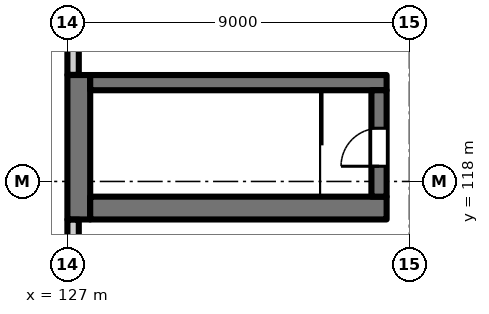
"""IFC4 building model, lengths in metres.
Left out: names, types, materials, properties, quantities, classifications, styles, units other than length and angle.
Written with IfcOpenShell. Run it as: python <this file> out.ifc"""

import sys

from ifc_helpers import new_model, si_unit, direction, frame, frame_2d, origin, place, context, subcontext, project, spatial, rectangle, extrude, element, fill, save


model = new_model("IFC4")
c1 = context("Model", 3, precision=1e-05, world=origin(), true_north=direction((0.0, 1.0)))
c2 = subcontext(c1, "Body", "Model", "MODEL_VIEW")
j1 = project(units=[si_unit("LENGTHUNIT", "METRE"), si_unit("PLANEANGLEUNIT", "RADIAN")], contexts=[c1])
p1 = place(None, origin())
s1 = spatial("IfcSite", under=j1, at=p1, CompositionType="ELEMENT")
p2 = place(p1, origin())
s2 = spatial("IfcBuilding", under=s1, at=p2, CompositionType="ELEMENT")
p3 = place(p2, frame((0.0, 0.0, 113.0)))
s3 = spatial("IfcBuildingStorey", under=s2, at=p3, CompositionType="ELEMENT", Elevation=113.0)
p4 = place(p3, frame((127.3, 117.0, 0.0), z_axis=(0.0, 0.0, 1.0), x_axis=(0.0, 1.0, 0.0)))
e1 = element("IfcWall", 1, at=p4, inside=s3, PredefinedType="SHEAR", context=c2, shape_type="SweptSolid", body=[
    extrude(rectangle(XDim=3.8, YDim=0.6, at=frame_2d((1.9, 0.0))), origin(), (0.0, 0.0, 1.0), 4.0),
])
p5 = place(p3, frame((127.6, 117.3, 0.0), z_axis=(0.0, 0.0, 1.0), x_axis=(1.0, 0.0, 0.0)))
e2 = element("IfcWall", 2, at=p5, inside=s3, PredefinedType="SHEAR", context=c2, shape_type="SweptSolid", body=[
    extrude(rectangle(XDim=7.8, YDim=0.6, at=frame_2d((3.9, 0.0))), origin(), (0.0, 0.0, 1.0), 4.0),
])
p6 = place(p3, frame((127.6, 120.6, 0.0), z_axis=(0.0, 0.0, 1.0), x_axis=(1.0, 0.0, 0.0)))
e3 = element("IfcWall", 3, at=p6, inside=s3, PredefinedType="SHEAR", context=c2, shape_type="SweptSolid", body=[
    extrude(rectangle(XDim=7.8, YDim=0.4, at=frame_2d((3.9, 0.0))), origin(), (0.0, 0.0, 1.0), 4.0),
])
p7 = place(p3, frame((135.2, 117.6, 0.0), z_axis=(0.0, 0.0, 1.0), x_axis=(0.0, 1.0, 0.0)))
e4 = element("IfcWall", 4, at=p7, inside=s3, PredefinedType="SHEAR", context=c2, shape_type="SweptSolid", body=[
    extrude(rectangle(XDim=2.8, YDim=0.4, at=frame_2d((1.4, 0.0))), origin(), (0.0, 0.0, 1.0), 4.0),
])
p8 = place(p7, frame((0.8, 0.0, 0.0)))
e5 = element("IfcOpeningElement", 5, at=p8, cuts=e4, PredefinedType="OPENING", context=c2, shape_type="SweptSolid", body=[
    extrude(rectangle(XDim=1.0, YDim=2.1, at=frame_2d((0.5, 1.05))), frame((0.0, 0.21, 0.0), z_axis=(0.0, -1.0, 0.0), x_axis=(1.0, 0.0, 0.0)), (0.0, 0.0, 1.0), 0.42),
])
p9 = place(p3, frame((127.15, 135.195, 0.0), z_axis=(0.0, 0.0, 1.0), x_axis=(0.0, -1.0, 0.0)))
e6 = element("IfcWall", 6, at=p9, inside=s3, PredefinedType="PARAPET", context=c2, shape_type="SweptSolid", body=[
    extrude(rectangle(XDim=14.39, YDim=0.3, at=frame_2d((7.195, 0.0))), origin(), (0.0, 0.0, 1.0), 1.1),
])
p10 = place(p3, frame((127.15, 116.995, 0.0), z_axis=(0.0, 0.0, 1.0), x_axis=(0.0, -1.0, 0.0)))
e7 = element("IfcWall", 7, at=p10, inside=s3, PredefinedType="PARAPET", context=c2, shape_type="SweptSolid", body=[
    extrude(rectangle(XDim=2.995, YDim=0.3, at=frame_2d((1.498, 0.0))), origin(), (0.0, 0.0, 1.0), 1.1),
])
p11 = place(p8, origin())
e8 = element("IfcDoor", 8, at=p11, inside=s3, OperationType="SINGLE_SWING_LEFT", PredefinedType="DOOR", context=c2, shape_type="SweptSolid", body=[
    extrude(rectangle(XDim=1.0, YDim=2.1, at=frame_2d((0.5, 1.05))), frame((0.0, 0.025, 0.0), z_axis=(0.0, -1.0, 0.0), x_axis=(1.0, 0.0, 0.0)), (0.0, 0.0, 1.0), 0.05),
])
fill(e5, e8)
save(model, sys.argv[1])
